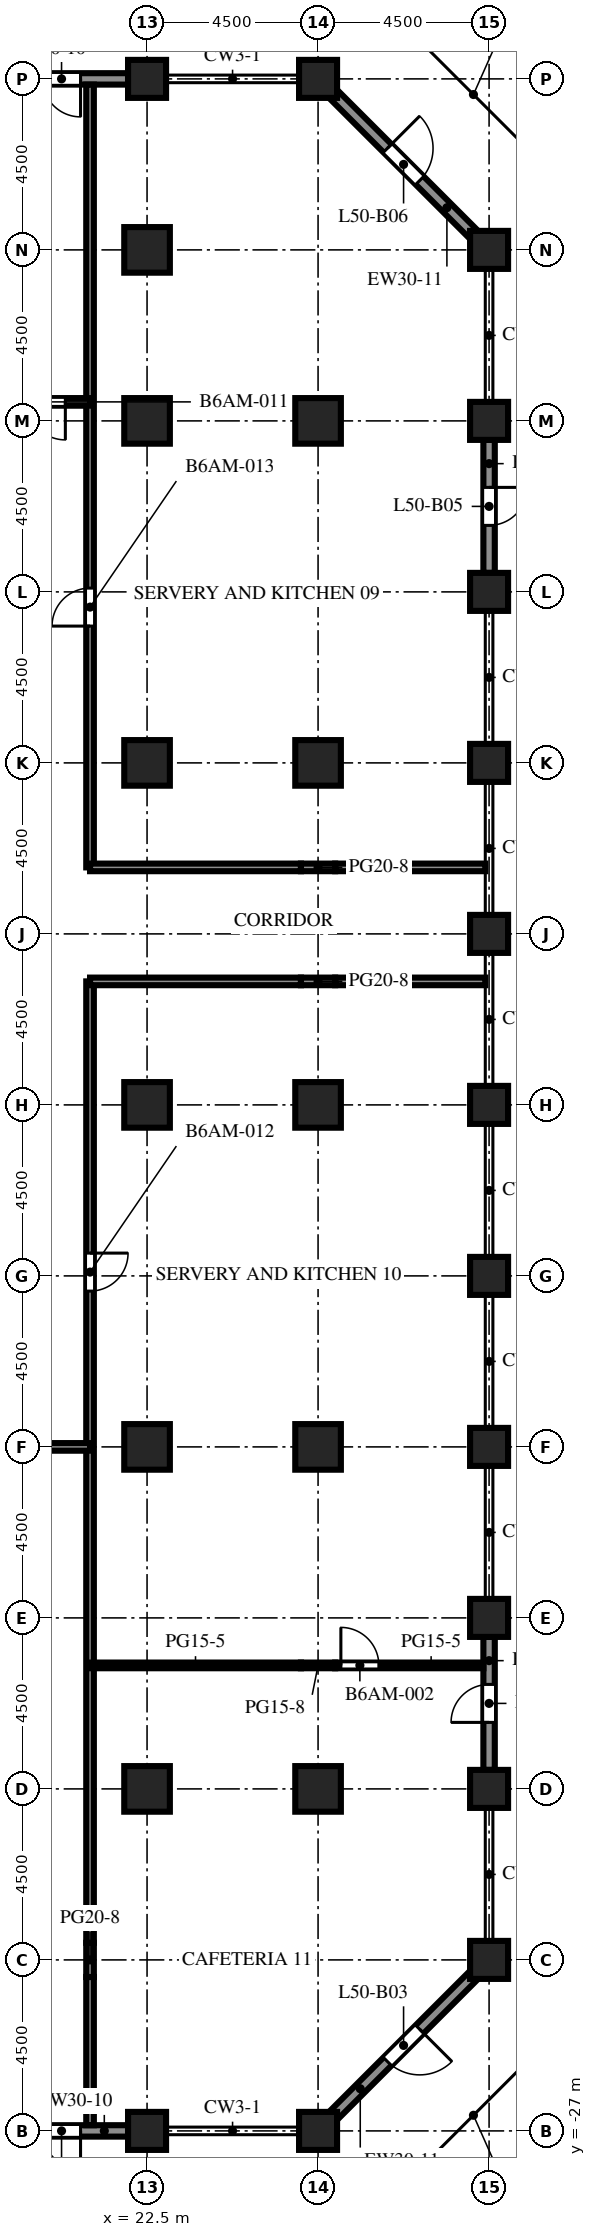
"""IFC4 building model, lengths in metres.
Left out: names, types, materials, properties, quantities, classifications, styles, units other than length and angle.
Written with IfcOpenShell. Run it as: python <this file> out.ifc"""

import sys

from ifc_helpers import new_model, si_unit, direction, frame, frame_2d, origin, origin_2d, place, context, subcontext, project, spatial, rectangle, extrude, element, fill, save


model = new_model("IFC4")
c1 = context("Model", 3, precision=1e-05, world=origin(), true_north=direction((0.0, 1.0)))
c2 = subcontext(c1, "Body", "Model", "MODEL_VIEW")
j1 = project(units=[si_unit("LENGTHUNIT", "METRE"), si_unit("PLANEANGLEUNIT", "RADIAN")], contexts=[c1])
p1 = place(None, origin())
s1 = spatial("IfcSite", under=j1, at=p1, CompositionType="ELEMENT")
p2 = place(p1, origin())
s2 = spatial("IfcBuilding", under=s1, at=p2, CompositionType="ELEMENT")
p3 = place(p2, frame((0.0, 0.0, 220.2)))
s3 = spatial("IfcBuildingStorey", under=s2, at=p3, CompositionType="ELEMENT", Elevation=220.2)
for number, where, z_axis, x_axis in (
    (1, (22.5, -27.0, 0.0), (0.0, 0.0, 1.0), (1.0, 0.0, 0.0)),
    (2, (22.5, 27.0, 0.0), (0.0, 0.0, 1.0), (1.0, 0.0, 0.0)),
):
    element("IfcColumn", number, at=place(p3, frame(where, z_axis=z_axis, x_axis=x_axis)), inside=s3, PredefinedType="COLUMN", context=c2, shape_type="SweptSolid", body=[
        extrude(rectangle(XDim=1.0, YDim=1.0, at=origin_2d()), origin(), (0.0, 0.0, 1.0), 6.0),
    ])
for number, where, z_axis, x_axis in (
    (3, (27.0, -27.0, 0.0), (0.0, 0.0, 1.0), (1.0, 0.0, 0.0)),
    (4, (27.0, 27.0, 0.0), (0.0, 0.0, 1.0), (1.0, 0.0, 0.0)),
):
    element("IfcColumn", number, at=place(p3, frame(where, z_axis=z_axis, x_axis=x_axis)), inside=s3, PredefinedType="COLUMN", context=c2, shape_type="SweptSolid", body=[
        extrude(rectangle(XDim=1.0, YDim=1.0, at=origin_2d()), origin(), (0.0, 0.0, 1.0), 3.6),
    ])
for number, where, z_axis, x_axis in (
    (5, (31.5, -22.5, 0.0), (0.0, 0.0, 1.0), (1.0, 0.0, 0.0)),
    (6, (31.5, -18.0, 0.0), (0.0, 0.0, 1.0), (1.0, 0.0, 0.0)),
    (7, (31.5, -13.5, 0.0), (0.0, 0.0, 1.0), (1.0, 0.0, 0.0)),
    (8, (31.5, -9.0, 0.0), (0.0, 0.0, 1.0), (1.0, 0.0, 0.0)),
    (9, (31.5, -4.5, 0.0), (0.0, 0.0, 1.0), (1.0, 0.0, 0.0)),
    (10, (31.5, 0.0, 0.0), (0.0, 0.0, 1.0), (1.0, 0.0, 0.0)),
    (11, (31.5, 4.5, 0.0), (0.0, 0.0, 1.0), (1.0, 0.0, 0.0)),
    (12, (31.5, 9.0, 0.0), (0.0, 0.0, 1.0), (1.0, 0.0, 0.0)),
    (13, (31.5, 13.5, 0.0), (0.0, 0.0, 1.0), (1.0, 0.0, 0.0)),
    (14, (31.5, 18.0, 0.0), (0.0, 0.0, 1.0), (1.0, 0.0, 0.0)),
    (15, (31.5, 22.5, 0.0), (0.0, 0.0, 1.0), (1.0, 0.0, 0.0)),
):
    element("IfcColumn", number, at=place(p3, frame(where, z_axis=z_axis, x_axis=x_axis)), inside=s3, PredefinedType="COLUMN", context=c2, shape_type="SweptSolid", body=[
        extrude(rectangle(XDim=1.0, YDim=1.0, at=origin_2d()), origin(), (0.0, 0.0, 1.0), 6.0),
    ])
for number, where, z_axis, x_axis in (
    (16, (22.5, -18.0, 0.0), (0.0, 0.0, 1.0), (1.0, 0.0, 0.0)),
    (17, (22.5, -9.0, 0.0), (0.0, 0.0, 1.0), (1.0, 0.0, 0.0)),
    (18, (22.5, 0.0, 0.0), (0.0, 0.0, 1.0), (1.0, 0.0, 0.0)),
    (19, (22.5, 9.0, 0.0), (0.0, 0.0, 1.0), (1.0, 0.0, 0.0)),
    (20, (22.5, 18.0, 0.0), (0.0, 0.0, 1.0), (1.0, 0.0, 0.0)),
    (21, (22.5, 22.5, 0.0), (0.0, 0.0, 1.0), (1.0, 0.0, 0.0)),
):
    element("IfcColumn", number, at=place(p3, frame(where, z_axis=z_axis, x_axis=x_axis)), inside=s3, PredefinedType="COLUMN", context=c2, shape_type="SweptSolid", body=[
        extrude(rectangle(XDim=1.2, YDim=1.2, at=origin_2d()), origin(), (0.0, 0.0, 1.0), 6.0),
    ])
for number, where, z_axis, x_axis in (
    (22, (27.0, -18.0, 0.0), (0.0, 0.0, 1.0), (1.0, 0.0, 0.0)),
    (23, (27.0, -9.0, 0.0), (0.0, 0.0, 1.0), (1.0, 0.0, 0.0)),
    (24, (27.0, 0.0, 0.0), (0.0, 0.0, 1.0), (1.0, 0.0, 0.0)),
    (25, (27.0, 9.0, 0.0), (0.0, 0.0, 1.0), (1.0, 0.0, 0.0)),
    (26, (27.0, 18.0, 0.0), (0.0, 0.0, 1.0), (1.0, 0.0, 0.0)),
):
    element("IfcColumn", number, at=place(p3, frame(where, z_axis=z_axis, x_axis=x_axis)), inside=s3, PredefinedType="COLUMN", context=c2, shape_type="SweptSolid", body=[
        extrude(rectangle(XDim=1.2, YDim=1.2, at=origin_2d()), origin(), (0.0, 0.0, 1.0), 5.4),
    ])
p4 = place(p3, frame((22.0, -27.0, 0.0), z_axis=(0.0, 0.0, 1.0), x_axis=(-1.0, 0.0, 0.0)))
e27 = element("IfcWall", 27, at=p4, inside=s3, PredefinedType="SOLIDWALL", context=c2, shape_type="SweptSolid", body=[
    extrude(rectangle(XDim=3.5, YDim=0.3, at=frame_2d((1.75, 0.0))), origin(), (0.0, 0.0, 1.0), 4.6),
])
p5 = place(p4, frame((1.25, 0.0, 0.0)))
e28 = element("IfcOpeningElement", 28, at=p5, cuts=e27, PredefinedType="OPENING", context=c2, shape_type="SweptSolid", body=[
    extrude(rectangle(XDim=1.0, YDim=2.2, at=frame_2d((0.5, 1.1))), frame((0.0, 0.16, 0.0), z_axis=(0.0, -1.0, 0.0), x_axis=(1.0, 0.0, 0.0)), (0.0, 0.0, 1.0), 0.32),
])
p6 = place(p3, frame((31.106, -22.894, 0.0), z_axis=(0.0, 0.0, 1.0), x_axis=(-0.707106781187, -0.707106781187, 0.0)))
e29 = element("IfcWall", 29, at=p6, inside=s3, PredefinedType="SOLIDWALL", context=c2, shape_type="SweptSolid", body=[
    extrude(rectangle(XDim=5.25, YDim=0.3, at=frame_2d((2.625, 0.0))), origin(), (0.0, 0.0, 1.0), 3.6),
])
p7 = place(p6, frame((2.025, 0.0, 0.0)))
e30 = element("IfcOpeningElement", 30, at=p7, cuts=e29, PredefinedType="OPENING", context=c2, shape_type="SweptSolid", body=[
    extrude(rectangle(XDim=1.2, YDim=2.2, at=frame_2d((0.6, 1.1))), frame((0.0, 0.16, 0.0), z_axis=(0.0, -1.0, 0.0), x_axis=(1.0, 0.0, 0.0)), (0.0, 0.0, 1.0), 0.32),
])
p8 = place(p3, frame((31.5, -14.0, 0.0), z_axis=(0.0, 0.0, 1.0), x_axis=(0.0, -1.0, 0.0)))
e31 = element("IfcWall", 31, at=p8, inside=s3, PredefinedType="SOLIDWALL", context=c2, shape_type="SweptSolid", body=[
    extrude(rectangle(XDim=3.5, YDim=0.3, at=frame_2d((1.75, 0.0))), origin(), (0.0, 0.0, 1.0), 4.6),
])
p9 = place(p8, frame((1.25, 0.0, 0.0)))
e32 = element("IfcOpeningElement", 32, at=p9, cuts=e31, PredefinedType="OPENING", context=c2, shape_type="SweptSolid", body=[
    extrude(rectangle(XDim=1.0, YDim=2.2, at=frame_2d((0.5, 1.1))), frame((0.0, 0.16, 0.0), z_axis=(0.0, -1.0, 0.0), x_axis=(1.0, 0.0, 0.0)), (0.0, 0.0, 1.0), 0.32),
])
p10 = place(p3, frame((31.5, 17.5, 0.0), z_axis=(0.0, 0.0, 1.0), x_axis=(0.0, -1.0, 0.0)))
e33 = element("IfcWall", 33, at=p10, inside=s3, PredefinedType="SOLIDWALL", context=c2, shape_type="SweptSolid", body=[
    extrude(rectangle(XDim=3.5, YDim=0.3, at=frame_2d((1.75, 0.0))), origin(), (0.0, 0.0, 1.0), 4.6),
])
p11 = place(p10, frame((1.25, 0.0, 0.0)))
e34 = element("IfcOpeningElement", 34, at=p11, cuts=e33, PredefinedType="OPENING", context=c2, shape_type="SweptSolid", body=[
    extrude(rectangle(XDim=1.0, YDim=2.2, at=frame_2d((0.5, 1.1))), frame((0.0, 0.16, 0.0), z_axis=(0.0, -1.0, 0.0), x_axis=(1.0, 0.0, 0.0)), (0.0, 0.0, 1.0), 0.32),
])
p12 = place(p3, frame((27.394, 26.606, 0.0), z_axis=(0.0, 0.0, 1.0), x_axis=(0.707106781187, -0.707106781187, 0.0)))
e35 = element("IfcWall", 35, at=p12, inside=s3, PredefinedType="SOLIDWALL", context=c2, shape_type="SweptSolid", body=[
    extrude(rectangle(XDim=5.25, YDim=0.3, at=frame_2d((2.625, 0.0))), origin(), (0.0, 0.0, 1.0), 3.6),
])
p13 = place(p12, frame((2.025, 0.0, 0.0)))
e36 = element("IfcOpeningElement", 36, at=p13, cuts=e35, PredefinedType="OPENING", context=c2, shape_type="SweptSolid", body=[
    extrude(rectangle(XDim=1.2, YDim=2.2, at=frame_2d((0.6, 1.1))), frame((0.0, 0.16, 0.0), z_axis=(0.0, -1.0, 0.0), x_axis=(1.0, 0.0, 0.0)), (0.0, 0.0, 1.0), 0.32),
])
p14 = place(p3, frame((18.5, 27.0, 0.0), z_axis=(0.0, 0.0, 1.0), x_axis=(1.0, 0.0, 0.0)))
e37 = element("IfcWall", 37, at=p14, inside=s3, PredefinedType="SOLIDWALL", context=c2, shape_type="SweptSolid", body=[
    extrude(rectangle(XDim=3.5, YDim=0.3, at=frame_2d((1.75, 0.0))), origin(), (0.0, 0.0, 1.0), 4.6),
])
p15 = place(p14, frame((1.25, 0.0, 0.0)))
e38 = element("IfcOpeningElement", 38, at=p15, cuts=e37, PredefinedType="OPENING", context=c2, shape_type="SweptSolid", body=[
    extrude(rectangle(XDim=1.0, YDim=2.2, at=frame_2d((0.5, 1.1))), frame((0.0, 0.16, 0.0), z_axis=(0.0, -1.0, 0.0), x_axis=(1.0, 0.0, 0.0)), (0.0, 0.0, 1.0), 0.32),
])
p16 = place(p3, frame((21.0, -26.85, 0.0), z_axis=(0.0, 0.0, 1.0), x_axis=(0.0, 1.0, 0.0)))
e39 = element("IfcWall", 39, at=p16, inside=s3, PredefinedType="PARTITIONING", context=c2, shape_type="SweptSolid", body=[
    extrude(rectangle(XDim=3.9, YDim=0.2, at=frame_2d((1.95, 0.0))), origin(), (0.0, 0.0, 1.0), 5.4),
])
p17 = place(p3, frame((21.0, -22.95, 0.0), z_axis=(0.0, 0.0, 1.0), x_axis=(0.0, 1.0, 0.0)))
e40 = element("IfcWall", 40, at=p17, inside=s3, PredefinedType="PARTITIONING", context=c2, shape_type="SweptSolid", body=[
    extrude(rectangle(XDim=0.9, YDim=0.2, at=frame_2d((0.45, 0.0))), origin(), (0.0, 0.0, 1.0), 3.57),
])
p18 = place(p3, frame((21.0, 3.25, 0.0), z_axis=(0.0, 0.0, 1.0), x_axis=(0.0, -1.0, 0.0)))
e41 = element("IfcWall", 41, at=p18, inside=s3, PredefinedType="PARTITIONING", context=c2, shape_type="SweptSolid", body=[
    extrude(rectangle(XDim=25.3, YDim=0.2, at=frame_2d((12.65, 0.0))), origin(), (0.0, 0.0, 1.0), 5.4),
])
p19 = place(p18, frame((7.15, 0.0, 0.0)))
e42 = element("IfcOpeningElement", 42, at=p19, cuts=e41, PredefinedType="OPENING", context=c2, shape_type="SweptSolid", body=[
    extrude(rectangle(XDim=1.0, YDim=2.1, at=frame_2d((0.5, 1.05))), frame((0.0, 0.11, 0.0), z_axis=(0.0, -1.0, 0.0), x_axis=(1.0, 0.0, 0.0)), (0.0, 0.0, 1.0), 0.22),
])
p20 = place(p3, frame((21.0, 26.85, 0.0), z_axis=(0.0, 0.0, 1.0), x_axis=(0.0, -1.0, 0.0)))
e43 = element("IfcWall", 43, at=p20, inside=s3, PredefinedType="PARTITIONING", context=c2, shape_type="SweptSolid", body=[
    extrude(rectangle(XDim=20.6, YDim=0.2, at=frame_2d((10.3, 0.0))), origin(), (0.0, 0.0, 1.0), 5.4),
])
p21 = place(p20, frame((13.25, 0.0, 0.0)))
e44 = element("IfcOpeningElement", 44, at=p21, cuts=e43, PredefinedType="OPENING", context=c2, shape_type="SweptSolid", body=[
    extrude(rectangle(XDim=1.0, YDim=2.1, at=frame_2d((0.5, 1.05))), frame((0.0, 0.11, 0.0), z_axis=(0.0, -1.0, 0.0), x_axis=(1.0, 0.0, 0.0)), (0.0, 0.0, 1.0), 0.22),
])
p22 = place(p3, frame((21.0, -14.75, 0.0), z_axis=(0.0, 0.0, 1.0), x_axis=(1.0, 0.0, 0.0)))
e45 = element("IfcWall", 45, at=p22, inside=s3, PredefinedType="PARTITIONING", context=c2, shape_type="SweptSolid", body=[
    extrude(rectangle(XDim=5.55, YDim=0.15, at=frame_2d((2.775, 0.0))), origin(), (0.0, 0.0, 1.0), 5.4),
])
p23 = place(p3, frame((26.55, -14.75, 0.0), z_axis=(0.0, 0.0, 1.0), x_axis=(1.0, 0.0, 0.0)))
e46 = element("IfcWall", 46, at=p23, inside=s3, PredefinedType="PARTITIONING", context=c2, shape_type="SweptSolid", body=[
    extrude(rectangle(XDim=0.9, YDim=0.15, at=frame_2d((0.45, 0.0))), origin(), (0.0, 0.0, 1.0), 3.57),
])
p24 = place(p3, frame((31.35, -14.75, 0.0), z_axis=(0.0, 0.0, 1.0), x_axis=(-1.0, 0.0, 0.0)))
e47 = element("IfcWall", 47, at=p24, inside=s3, PredefinedType="PARTITIONING", context=c2, shape_type="SweptSolid", body=[
    extrude(rectangle(XDim=3.9, YDim=0.15, at=frame_2d((1.95, 0.0))), origin(), (0.0, 0.0, 1.0), 5.4),
])
p25 = place(p24, frame((2.75, 0.0, 0.0)))
e48 = element("IfcOpeningElement", 48, at=p25, cuts=e47, PredefinedType="OPENING", context=c2, shape_type="SweptSolid", body=[
    extrude(rectangle(XDim=1.0, YDim=2.1, at=frame_2d((0.5, 1.05))), frame((0.0, 0.085, 0.0), z_axis=(0.0, -1.0, 0.0), x_axis=(1.0, 0.0, 0.0)), (0.0, 0.0, 1.0), 0.17),
])
p26 = place(p3, frame((21.0, -9.0, 0.0), z_axis=(0.0, 0.0, 1.0), x_axis=(-1.0, 0.0, 0.0)))
e49 = element("IfcWall", 49, at=p26, inside=s3, PredefinedType="PARTITIONING", context=c2, shape_type="SweptSolid", body=[
    extrude(rectangle(XDim=3.0, YDim=0.2, at=frame_2d((1.5, 0.0))), origin(), (0.0, 0.0, 1.0), 5.4),
])
p27 = place(p26, frame((1.15, 0.0, 0.0)))
e50 = element("IfcOpeningElement", 50, at=p27, cuts=e49, PredefinedType="OPENING", context=c2, shape_type="SweptSolid", body=[
    extrude(rectangle(XDim=1.0, YDim=2.1, at=frame_2d((0.5, 1.05))), frame((0.0, 0.11, 0.0), z_axis=(0.0, -1.0, 0.0), x_axis=(1.0, 0.0, 0.0)), (0.0, 0.0, 1.0), 0.22),
])
p28 = place(p3, frame((21.0, 3.25, 0.0), z_axis=(0.0, 0.0, 1.0), x_axis=(1.0, 0.0, 0.0)))
e51 = element("IfcWall", 51, at=p28, inside=s3, PredefinedType="PARTITIONING", context=c2, shape_type="SweptSolid", body=[
    extrude(rectangle(XDim=5.55, YDim=0.2, at=frame_2d((2.775, 0.0))), origin(), (0.0, 0.0, 1.0), 5.4),
])
p29 = place(p3, frame((26.55, 3.25, 0.0), z_axis=(0.0, 0.0, 1.0), x_axis=(1.0, 0.0, 0.0)))
e52 = element("IfcWall", 52, at=p29, inside=s3, PredefinedType="PARTITIONING", context=c2, shape_type="SweptSolid", body=[
    extrude(rectangle(XDim=0.9, YDim=0.2, at=frame_2d((0.45, 0.0))), origin(), (0.0, 0.0, 1.0), 3.57),
])
p30 = place(p3, frame((27.45, 3.25, 0.0), z_axis=(0.0, 0.0, 1.0), x_axis=(1.0, 0.0, 0.0)))
e53 = element("IfcWall", 53, at=p30, inside=s3, PredefinedType="PARTITIONING", context=c2, shape_type="SweptSolid", body=[
    extrude(rectangle(XDim=3.95, YDim=0.2, at=frame_2d((1.975, 0.0))), origin(), (0.0, 0.0, 1.0), 5.4),
])
p31 = place(p3, frame((21.0, 6.25, 0.0), z_axis=(0.0, 0.0, 1.0), x_axis=(1.0, 0.0, 0.0)))
e54 = element("IfcWall", 54, at=p31, inside=s3, PredefinedType="PARTITIONING", context=c2, shape_type="SweptSolid", body=[
    extrude(rectangle(XDim=5.55, YDim=0.2, at=frame_2d((2.775, 0.0))), origin(), (0.0, 0.0, 1.0), 5.4),
])
p32 = place(p3, frame((26.55, 6.25, 0.0), z_axis=(0.0, 0.0, 1.0), x_axis=(1.0, 0.0, 0.0)))
e55 = element("IfcWall", 55, at=p32, inside=s3, PredefinedType="PARTITIONING", context=c2, shape_type="SweptSolid", body=[
    extrude(rectangle(XDim=0.9, YDim=0.2, at=frame_2d((0.45, 0.0))), origin(), (0.0, 0.0, 1.0), 3.57),
])
p33 = place(p3, frame((27.45, 6.25, 0.0), z_axis=(0.0, 0.0, 1.0), x_axis=(1.0, 0.0, 0.0)))
e56 = element("IfcWall", 56, at=p33, inside=s3, PredefinedType="PARTITIONING", context=c2, shape_type="SweptSolid", body=[
    extrude(rectangle(XDim=3.95, YDim=0.2, at=frame_2d((1.975, 0.0))), origin(), (0.0, 0.0, 1.0), 5.4),
])
p34 = place(p3, frame((18.0, 18.5, 0.0), z_axis=(0.0, 0.0, 1.0), x_axis=(1.0, 0.0, 0.0)))
e57 = element("IfcWall", 57, at=p34, inside=s3, PredefinedType="PARTITIONING", context=c2, shape_type="SweptSolid", body=[
    extrude(rectangle(XDim=3.0, YDim=0.2, at=frame_2d((1.5, 0.0))), origin(), (0.0, 0.0, 1.0), 5.4),
])
p35 = place(p34, frame((1.35, 0.0, 0.0)))
e58 = element("IfcOpeningElement", 58, at=p35, cuts=e57, PredefinedType="OPENING", context=c2, shape_type="SweptSolid", body=[
    extrude(rectangle(XDim=1.0, YDim=2.1, at=frame_2d((0.5, 1.05))), frame((0.0, 0.11, 0.0), z_axis=(0.0, -1.0, 0.0), x_axis=(1.0, 0.0, 0.0)), (0.0, 0.0, 1.0), 0.22),
])
p36 = place(p5, origin())
e59 = element("IfcDoor", 59, at=p36, inside=s3, OperationType="SINGLE_SWING_LEFT", PredefinedType="DOOR", context=c2, shape_type="SweptSolid", body=[
    extrude(rectangle(XDim=1.0, YDim=2.2, at=frame_2d((0.5, 1.1))), frame((0.0, 0.025, 0.0), z_axis=(0.0, -1.0, 0.0), x_axis=(1.0, 0.0, 0.0)), (0.0, 0.0, 1.0), 0.05),
])
fill(e28, e59)
p37 = place(p7, origin())
e60 = element("IfcDoor", 60, at=p37, inside=s3, OperationType="SINGLE_SWING_LEFT", PredefinedType="DOOR", context=c2, shape_type="SweptSolid", body=[
    extrude(rectangle(XDim=1.2, YDim=2.2, at=frame_2d((0.6, 1.1))), frame((0.0, 0.025, 0.0), z_axis=(0.0, -1.0, 0.0), x_axis=(1.0, 0.0, 0.0)), (0.0, 0.0, 1.0), 0.05),
])
fill(e30, e60)
p38 = place(p9, origin())
e61 = element("IfcDoor", 61, at=p38, inside=s3, OperationType="SINGLE_SWING_RIGHT", PredefinedType="DOOR", context=c2, shape_type="SweptSolid", body=[
    extrude(rectangle(XDim=1.0, YDim=2.2, at=frame_2d((0.5, 1.1))), frame((0.0, 0.025, 0.0), z_axis=(0.0, -1.0, 0.0), x_axis=(1.0, 0.0, 0.0)), (0.0, 0.0, 1.0), 0.05),
])
fill(e32, e61)
p39 = place(p11, origin())
e62 = element("IfcDoor", 62, at=p39, inside=s3, OperationType="SINGLE_SWING_LEFT", PredefinedType="DOOR", context=c2, shape_type="SweptSolid", body=[
    extrude(rectangle(XDim=1.0, YDim=2.2, at=frame_2d((0.5, 1.1))), frame((0.0, 0.025, 0.0), z_axis=(0.0, -1.0, 0.0), x_axis=(1.0, 0.0, 0.0)), (0.0, 0.0, 1.0), 0.05),
])
fill(e34, e62)
p40 = place(p13, origin())
e63 = element("IfcDoor", 63, at=p40, inside=s3, OperationType="SINGLE_SWING_LEFT", PredefinedType="DOOR", context=c2, shape_type="SweptSolid", body=[
    extrude(rectangle(XDim=1.2, YDim=2.2, at=frame_2d((0.6, 1.1))), frame((0.0, 0.025, 0.0), z_axis=(0.0, -1.0, 0.0), x_axis=(1.0, 0.0, 0.0)), (0.0, 0.0, 1.0), 0.05),
])
fill(e36, e63)
p41 = place(p15, origin())
e64 = element("IfcDoor", 64, at=p41, inside=s3, OperationType="SINGLE_SWING_RIGHT", PredefinedType="DOOR", context=c2, shape_type="SweptSolid", body=[
    extrude(rectangle(XDim=1.0, YDim=2.2, at=frame_2d((0.5, 1.1))), frame((0.0, 0.025, 0.0), z_axis=(0.0, -1.0, 0.0), x_axis=(1.0, 0.0, 0.0)), (0.0, 0.0, 1.0), 0.05),
])
fill(e38, e64)
p42 = place(p25, origin())
e65 = element("IfcDoor", 65, at=p42, inside=s3, OperationType="SINGLE_SWING_RIGHT", PredefinedType="DOOR", context=c2, shape_type="SweptSolid", body=[
    extrude(rectangle(XDim=1.0, YDim=2.1, at=frame_2d((0.5, 1.05))), frame((0.0, 0.025, 0.0), z_axis=(0.0, -1.0, 0.0), x_axis=(1.0, 0.0, 0.0)), (0.0, 0.0, 1.0), 0.05),
])
fill(e48, e65)
p43 = place(p35, origin())
e66 = element("IfcDoor", 66, at=p43, inside=s3, OperationType="SINGLE_SWING_RIGHT", PredefinedType="DOOR", context=c2, shape_type="SweptSolid", body=[
    extrude(rectangle(XDim=1.0, YDim=2.1, at=frame_2d((0.5, 1.05))), frame((0.0, 0.025, 0.0), z_axis=(0.0, -1.0, 0.0), x_axis=(1.0, 0.0, 0.0)), (0.0, 0.0, 1.0), 0.05),
])
fill(e58, e66)
p44 = place(p19, origin())
e67 = element("IfcDoor", 67, at=p44, inside=s3, OperationType="SINGLE_SWING_LEFT", PredefinedType="DOOR", context=c2, shape_type="SweptSolid", body=[
    extrude(rectangle(XDim=1.0, YDim=2.1, at=frame_2d((0.5, 1.05))), frame((0.0, 0.025, 0.0), z_axis=(0.0, -1.0, 0.0), x_axis=(1.0, 0.0, 0.0)), (0.0, 0.0, 1.0), 0.05),
])
fill(e42, e67)
p45 = place(p21, origin())
e68 = element("IfcDoor", 68, at=p45, inside=s3, OperationType="SINGLE_SWING_RIGHT", PredefinedType="DOOR", context=c2, shape_type="SweptSolid", body=[
    extrude(rectangle(XDim=1.0, YDim=2.1, at=frame_2d((0.5, 1.05))), frame((0.0, 0.025, 0.0), z_axis=(0.0, -1.0, 0.0), x_axis=(1.0, 0.0, 0.0)), (0.0, 0.0, 1.0), 0.05),
])
fill(e44, e68)
save(model, sys.argv[1])
